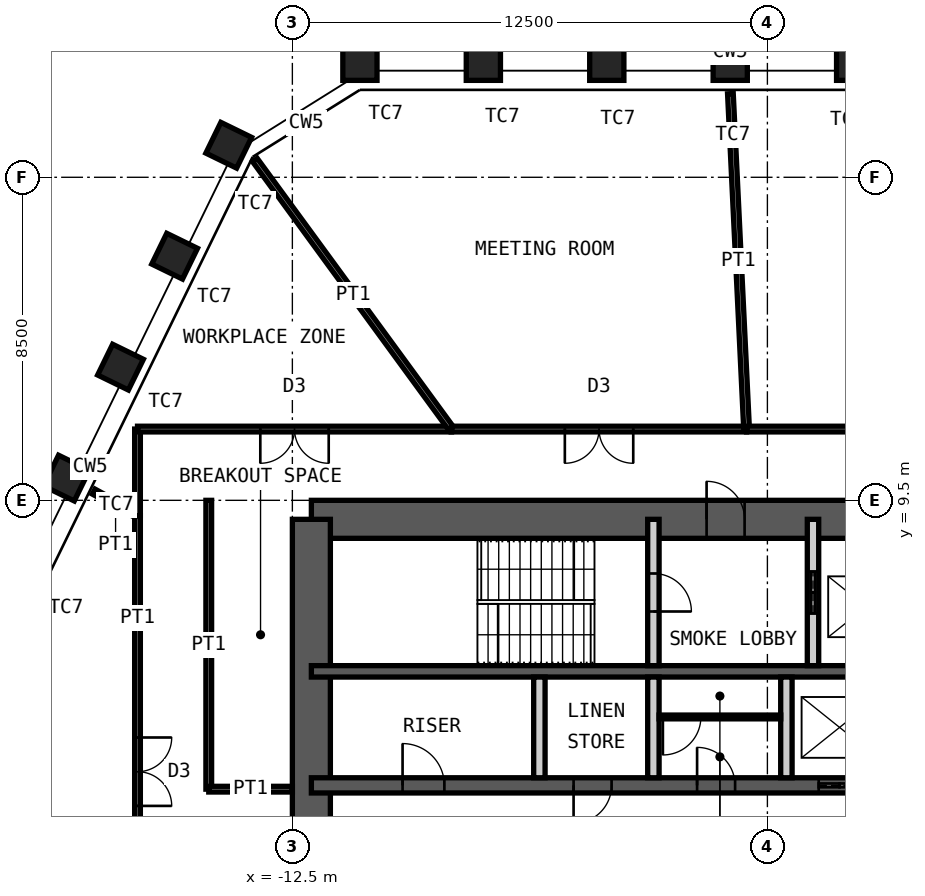
"""IFC4 building model, lengths in metres.
Left out: names, types, materials, properties, quantities, classifications, styles, units other than length and angle.
Written with IfcOpenShell. Run it as: python <this file> out.ifc"""

import sys

from ifc_helpers import new_model, si_unit, direction, frame, frame_2d, origin, origin_2d, place, context, subcontext, project, spatial, rectangle, hollow_rectangle, extrude, element, fill, save


model = new_model("IFC4")
c1 = context("Model", 3, precision=1e-05, world=origin(), true_north=direction((0.0, 1.0)))
c2 = subcontext(c1, "Body", "Model", "MODEL_VIEW")
j1 = project(units=[si_unit("LENGTHUNIT", "METRE"), si_unit("PLANEANGLEUNIT", "RADIAN")], contexts=[c1])
p1 = place(None, origin())
s1 = spatial("IfcSite", under=j1, at=p1, CompositionType="ELEMENT")
p2 = place(p1, origin())
s2 = spatial("IfcBuilding", under=s1, at=p2, CompositionType="ELEMENT")
p3 = place(p2, frame((0.0, 0.0, 295.6)))
s3 = spatial("IfcBuildingStorey", under=s2, at=p3, CompositionType="ELEMENT", Elevation=295.6)
for number, where, z_axis, x_axis in (
    (1, (-10.722, 21.0, 0.0), (0.0, 0.0, 1.0), (-1.0, 0.0, 0.0)),
    (2, (-7.474, 21.0, 0.0), (0.0, 0.0, 1.0), (-1.0, 0.0, 0.0)),
    (3, (-4.226, 21.0, 0.0), (0.0, 0.0, 1.0), (-1.0, 0.0, 0.0)),
    (4, (-0.978, 21.0, 0.0), (0.0, 0.0, 1.0), (-1.0, 0.0, 0.0)),
    (5, (2.27, 21.0, 0.0), (0.0, 0.0, 1.0), (-1.0, 0.0, 0.0)),
    (6, (-18.446, 10.085, 0.0), (0.0, 0.0, 1.0), (-0.438, -0.899, 0.0)),
    (7, (-17.022, 13.004, 0.0), (0.0, 0.0, 1.0), (-0.438, -0.899, 0.0)),
    (8, (-15.598, 15.924, 0.0), (0.0, 0.0, 1.0), (-0.438, -0.899, 0.0)),
    (9, (-14.174, 18.843, 0.0), (0.0, 0.0, 1.0), (-0.438, -0.899, 0.0)),
):
    element("IfcColumn", number, at=place(p3, frame(where, z_axis=z_axis, x_axis=x_axis)), inside=s3, PredefinedType="COLUMN", context=c2, shape_type="SweptSolid", body=[
        extrude(hollow_rectangle(XDim=0.9, YDim=0.9, WallThickness=0.06, at=origin_2d()), origin(), (0.0, 0.0, 1.0), 4.2),
    ])
p4 = place(p3, frame((-12.0, 9.0, 0.0), z_axis=(0.0, 0.0, 1.0), x_axis=(1.0, 0.0, 0.0)))
e10 = element("IfcWall", 10, at=p4, inside=s3, PredefinedType="SHEAR", context=c2, shape_type="SweptSolid", body=[
    extrude(rectangle(XDim=24.0, YDim=1.0, at=frame_2d((12.0, 0.0))), origin(), (0.0, 0.0, 1.0), 4.2),
])
p5 = place(p4, frame((10.4, 0.0, 0.0)))
e11 = element("IfcOpeningElement", 11, at=p5, cuts=e10, PredefinedType="OPENING", context=c2, shape_type="SweptSolid", body=[
    extrude(rectangle(XDim=1.0, YDim=2.1, at=frame_2d((0.5, 1.05))), frame((0.0, 0.51, 0.0), z_axis=(0.0, -1.0, 0.0), x_axis=(1.0, 0.0, 0.0)), (0.0, 0.0, 1.0), 1.02),
])
p6 = place(p4, frame((17.6, 0.0, 0.0)))
e12 = element("IfcOpeningElement", 12, at=p6, cuts=e10, PredefinedType="OPENING", context=c2, shape_type="SweptSolid", body=[
    extrude(rectangle(XDim=0.9, YDim=2.1, at=frame_2d((0.45, 1.05))), frame((0.0, 0.51, 0.0), z_axis=(0.0, -1.0, 0.0), x_axis=(1.0, 0.0, 0.0)), (0.0, 0.0, 1.0), 1.02),
])
p7 = place(p4, frame((21.9, 0.0, 0.0)))
e13 = element("IfcOpeningElement", 13, at=p7, cuts=e10, PredefinedType="OPENING", context=c2, shape_type="SweptSolid", body=[
    extrude(rectangle(XDim=0.9, YDim=2.1, at=frame_2d((0.45, 1.05))), frame((0.0, 0.51, 0.0), z_axis=(0.0, -1.0, 0.0), x_axis=(1.0, 0.0, 0.0)), (0.0, 0.0, 1.0), 1.02),
])
p8 = place(p3, frame((-12.0, -9.0, 0.0), z_axis=(0.0, 0.0, 1.0), x_axis=(0.0, 1.0, 0.0)))
e14 = element("IfcWall", 14, at=p8, inside=s3, PredefinedType="SHEAR", context=c2, shape_type="SweptSolid", body=[
    extrude(rectangle(XDim=18.0, YDim=1.0, at=frame_2d((9.0, 0.0))), origin(), (0.0, 0.0, 1.0), 4.2),
])
p9 = place(p8, frame((8.1, 0.0, 0.0)))
e15 = element("IfcOpeningElement", 15, at=p9, cuts=e14, PredefinedType="OPENING", context=c2, shape_type="SweptSolid", body=[
    extrude(rectangle(XDim=1.8, YDim=2.1, at=frame_2d((0.9, 1.05))), frame((0.0, 0.51, 0.0), z_axis=(0.0, -1.0, 0.0), x_axis=(1.0, 0.0, 0.0)), (0.0, 0.0, 1.0), 1.02),
])
p10 = place(p3, frame((-12.0, 5.0, 0.0), z_axis=(0.0, 0.0, 1.0), x_axis=(1.0, 0.0, 0.0)))
e16 = element("IfcWall", 16, at=p10, inside=s3, PredefinedType="SHEAR", context=c2, shape_type="SweptSolid", body=[
    extrude(rectangle(XDim=24.0, YDim=0.3, at=frame_2d((12.0, 0.0))), origin(), (0.0, 0.0, 1.0), 4.2),
])
p11 = place(p3, frame((-12.0, 2.0, 0.0), z_axis=(0.0, 0.0, 1.0), x_axis=(1.0, 0.0, 0.0)))
e17 = element("IfcWall", 17, at=p11, inside=s3, PredefinedType="SHEAR", context=c2, shape_type="SweptSolid", body=[
    extrude(rectangle(XDim=24.0, YDim=0.4, at=frame_2d((12.0, 0.0))), origin(), (0.0, 0.0, 1.0), 4.2),
])
p12 = place(p11, frame((2.4, 0.0, 0.0)))
e18 = element("IfcOpeningElement", 18, at=p12, cuts=e17, PredefinedType="OPENING", context=c2, shape_type="SweptSolid", body=[
    extrude(rectangle(XDim=1.1, YDim=2.1, at=frame_2d((0.55, 1.05))), frame((0.0, 0.21, 0.0), z_axis=(0.0, -1.0, 0.0), x_axis=(1.0, 0.0, 0.0)), (0.0, 0.0, 1.0), 0.42),
])
p13 = place(p11, frame((22.0, 0.0, 0.0)))
e19 = element("IfcOpeningElement", 19, at=p13, cuts=e17, PredefinedType="OPENING", context=c2, shape_type="SweptSolid", body=[
    extrude(rectangle(XDim=1.1, YDim=2.1, at=frame_2d((0.55, 1.05))), frame((0.0, 0.21, 0.0), z_axis=(0.0, -1.0, 0.0), x_axis=(1.0, 0.0, 0.0)), (0.0, 0.0, 1.0), 0.42),
])
p14 = place(p11, frame((10.15, 0.0, 0.0)))
e20 = element("IfcOpeningElement", 20, at=p14, cuts=e17, PredefinedType="OPENING", context=c2, shape_type="SweptSolid", body=[
    extrude(rectangle(XDim=1.0, YDim=2.1, at=frame_2d((0.5, 1.05))), frame((0.0, 0.21, 0.0), z_axis=(0.0, -1.0, 0.0), x_axis=(1.0, 0.0, 0.0)), (0.0, 0.0, 1.0), 0.42),
])
p15 = place(p11, frame((6.9, 0.0, 0.0)))
e21 = element("IfcOpeningElement", 21, at=p15, cuts=e17, PredefinedType="OPENING", context=c2, shape_type="SweptSolid", body=[
    extrude(rectangle(XDim=1.0, YDim=2.1, at=frame_2d((0.5, 1.05))), frame((0.0, 0.21, 0.0), z_axis=(0.0, -1.0, 0.0), x_axis=(1.0, 0.0, 0.0)), (0.0, 0.0, 1.0), 0.42),
])
p16 = place(p11, frame((13.35, 0.0, 0.0)))
e22 = element("IfcOpeningElement", 22, at=p16, cuts=e17, PredefinedType="OPENING", context=c2, shape_type="SweptSolid", body=[
    extrude(rectangle(XDim=1.1, YDim=2.4, at=frame_2d((0.55, 1.2))), frame((0.0, 0.21, 0.0), z_axis=(0.0, -1.0, 0.0), x_axis=(1.0, 0.0, 0.0)), (0.0, 0.0, 1.0), 0.42),
])
p17 = place(p11, frame((16.15, 0.0, 0.0)))
e23 = element("IfcOpeningElement", 23, at=p17, cuts=e17, PredefinedType="OPENING", context=c2, shape_type="SweptSolid", body=[
    extrude(rectangle(XDim=1.1, YDim=2.4, at=frame_2d((0.55, 1.2))), frame((0.0, 0.21, 0.0), z_axis=(0.0, -1.0, 0.0), x_axis=(1.0, 0.0, 0.0)), (0.0, 0.0, 1.0), 0.42),
])
p18 = place(p11, frame((19.0, 0.0, 0.0)))
e24 = element("IfcOpeningElement", 24, at=p18, cuts=e17, PredefinedType="OPENING", context=c2, shape_type="SweptSolid", body=[
    extrude(rectangle(XDim=1.0, YDim=2.1, at=frame_2d((0.5, 1.05))), frame((0.0, 0.21, 0.0), z_axis=(0.0, -1.0, 0.0), x_axis=(1.0, 0.0, 0.0)), (0.0, 0.0, 1.0), 0.42),
])
p19 = place(p3, frame((-3.0, 5.15, 0.0), z_axis=(0.0, 0.0, 1.0), x_axis=(0.0, 1.0, 0.0)))
e25 = element("IfcWall", 25, at=p19, inside=s3, PredefinedType="PARTITIONING", context=c2, shape_type="SweptSolid", body=[
    extrude(rectangle(XDim=3.85, YDim=0.3, at=frame_2d((1.925, 0.0))), origin(), (0.0, 0.0, 1.0), 3.98),
])
p20 = place(p19, frame((1.425, 0.0, 0.0)))
e26 = element("IfcOpeningElement", 26, at=p20, cuts=e25, PredefinedType="OPENING", context=c2, shape_type="SweptSolid", body=[
    extrude(rectangle(XDim=1.0, YDim=2.1, at=frame_2d((0.5, 1.05))), frame((0.0, 0.16, 0.0), z_axis=(0.0, -1.0, 0.0), x_axis=(1.0, 0.0, 0.0)), (0.0, 0.0, 1.0), 0.32),
])
p21 = place(p3, frame((1.2, 5.15, 0.0), z_axis=(0.0, 0.0, 1.0), x_axis=(0.0, 1.0, 0.0)))
e27 = element("IfcWall", 27, at=p21, inside=s3, PredefinedType="PARTITIONING", context=c2, shape_type="SweptSolid", body=[
    extrude(rectangle(XDim=3.85, YDim=0.3, at=frame_2d((1.925, 0.0))), origin(), (0.0, 0.0, 1.0), 3.98),
])
p22 = place(p21, frame((1.375, 0.0, 0.0)))
e28 = element("IfcOpeningElement", 28, at=p22, cuts=e27, PredefinedType="OPENING", context=c2, shape_type="SweptSolid", body=[
    extrude(rectangle(XDim=1.1, YDim=2.4, at=frame_2d((0.55, 1.2))), frame((0.0, 0.16, 0.0), z_axis=(0.0, -1.0, 0.0), x_axis=(1.0, 0.0, 0.0)), (0.0, 0.0, 1.0), 0.32),
])
for number, where, z_axis, x_axis in (
    (29, (-6.0, 2.2, 0.0), (0.0, 0.0, 1.0), (0.0, 1.0, 0.0)),
    (30, (-3.0, 2.2, 0.0), (0.0, 0.0, 1.0), (0.0, 1.0, 0.0)),
    (31, (0.5, 2.2, 0.0), (0.0, 0.0, 1.0), (0.0, 1.0, 0.0)),
):
    element("IfcWall", number, at=place(p3, frame(where, z_axis=z_axis, x_axis=x_axis)), inside=s3, PredefinedType="PARTITIONING", context=c2, shape_type="SweptSolid", body=[
        extrude(rectangle(XDim=2.65, YDim=0.3, at=frame_2d((1.325, 0.0))), origin(), (0.0, 0.0, 1.0), 3.98),
    ])
p23 = place(p3, frame((-2.85, 3.8, 0.0), z_axis=(0.0, 0.0, 1.0), x_axis=(1.0, 0.0, 0.0)))
e32 = element("IfcWall", 32, at=p23, inside=s3, PredefinedType="PARTITIONING", context=c2, shape_type="SweptSolid", body=[
    extrude(rectangle(XDim=3.2, YDim=0.1, at=frame_2d((1.6, 0.0))), origin(), (0.0, 0.0, 1.0), 3.98),
])
p24 = place(p23, frame((0.1, 0.0, 0.0)))
e33 = element("IfcOpeningElement", 33, at=p24, cuts=e32, PredefinedType="OPENING", context=c2, shape_type="SweptSolid", body=[
    extrude(rectangle(XDim=1.0, YDim=2.4, at=frame_2d((0.5, 1.2))), frame((0.0, 0.06, 0.0), z_axis=(0.0, -1.0, 0.0), x_axis=(1.0, 0.0, 0.0)), (0.0, 0.0, 1.0), 0.12),
])
p25 = place(p3, frame((-17.729, 9.73, 0.0), z_axis=(0.0, 0.0, 1.0), x_axis=(0.87667364743, -0.481085559855, 0.0)))
e34 = element("IfcWall", 34, at=p25, inside=s3, PredefinedType="PARTITIONING", context=c2, shape_type="SweptSolid", body=[
    extrude(rectangle(XDim=1.316, YDim=0.15, at=frame_2d((0.658, 0.0))), origin(), (0.0, 0.0, 1.0), 2.93),
])
p26 = place(p3, frame((-16.575, 9.097, 0.0), z_axis=(0.0, 0.0, 1.0), x_axis=(0.0, 1.0, 0.0)))
e35 = element("IfcWall", 35, at=p26, inside=s3, PredefinedType="PARTITIONING", context=c2, shape_type="SweptSolid", body=[
    extrude(rectangle(XDim=2.278, YDim=0.15, at=frame_2d((1.139, 0.0))), origin(), (0.0, 0.0, 1.0), 4.03),
])
p27 = place(p3, frame((-16.575, 11.375, 0.0), z_axis=(0.0, 0.0, 1.0), x_axis=(1.0, 0.0, 0.0)))
e36 = element("IfcWall", 36, at=p27, inside=s3, PredefinedType="PARTITIONING", context=c2, shape_type="SweptSolid", body=[
    extrude(rectangle(XDim=8.263, YDim=0.15, at=frame_2d((4.131, 0.0))), origin(), (0.0, 0.0, 1.0), 4.03),
])
p28 = place(p27, frame((3.231, 0.0, 0.0)))
e37 = element("IfcOpeningElement", 37, at=p28, cuts=e36, PredefinedType="OPENING", context=c2, shape_type="SweptSolid", body=[
    extrude(rectangle(XDim=1.8, YDim=2.4, at=frame_2d((0.9, 1.2))), frame((0.0, 0.085, 0.0), z_axis=(0.0, -1.0, 0.0), x_axis=(1.0, 0.0, 0.0)), (0.0, 0.0, 1.0), 0.17),
])
p29 = place(p3, frame((-13.486, 18.455, 0.0), z_axis=(0.0, 0.0, 1.0), x_axis=(0.589997742419, -0.807404894672, 0.0)))
e38 = element("IfcWall", 38, at=p29, inside=s3, PredefinedType="PARTITIONING", context=c2, shape_type="SweptSolid", body=[
    extrude(rectangle(XDim=8.769, YDim=0.15, at=frame_2d((4.385, 0.0))), origin(), (0.0, 0.0, 1.0), 3.03),
])
p30 = place(p3, frame((-8.312, 11.375, 0.0), z_axis=(0.0, 0.0, 1.0), x_axis=(1.0, 0.0, 0.0)))
e39 = element("IfcWall", 39, at=p30, inside=s3, PredefinedType="PARTITIONING", context=c2, shape_type="SweptSolid", body=[
    extrude(rectangle(XDim=7.764, YDim=0.15, at=frame_2d((3.882, 0.0))), origin(), (0.0, 0.0, 1.0), 4.03),
])
p31 = place(p30, frame((2.982, 0.0, 0.0)))
e40 = element("IfcOpeningElement", 40, at=p31, cuts=e39, PredefinedType="OPENING", context=c2, shape_type="SweptSolid", body=[
    extrude(rectangle(XDim=1.8, YDim=2.4, at=frame_2d((0.9, 1.2))), frame((0.0, 0.085, 0.0), z_axis=(0.0, -1.0, 0.0), x_axis=(1.0, 0.0, 0.0)), (0.0, 0.0, 1.0), 0.17),
])
p32 = place(p3, frame((-0.973, 20.2, 0.0), z_axis=(0.0, 0.0, 1.0), x_axis=(0.048134910622, -0.998840843368, 0.0)))
e41 = element("IfcWall", 41, at=p32, inside=s3, PredefinedType="PARTITIONING", context=c2, shape_type="SweptSolid", body=[
    extrude(rectangle(XDim=8.835, YDim=0.15, at=frame_2d((4.418, 0.0))), origin(), (0.0, 0.0, 1.0), 2.93),
])
p33 = place(p3, frame((-0.548, 11.375, 0.0), z_axis=(0.0, 0.0, 1.0), x_axis=(1.0, 0.0, 0.0)))
e42 = element("IfcWall", 42, at=p33, inside=s3, PredefinedType="PARTITIONING", context=c2, shape_type="SweptSolid", body=[
    extrude(rectangle(XDim=13.923, YDim=0.15, at=frame_2d((6.961, 0.0))), origin(), (0.0, 0.0, 1.0), 4.03),
])
p34 = place(p33, frame((6.062, 0.0, 0.0)))
e43 = element("IfcOpeningElement", 43, at=p34, cuts=e42, PredefinedType="OPENING", context=c2, shape_type="SweptSolid", body=[
    extrude(rectangle(XDim=1.8, YDim=2.4, at=frame_2d((0.9, 1.2))), frame((0.0, 0.085, 0.0), z_axis=(0.0, -1.0, 0.0), x_axis=(1.0, 0.0, 0.0)), (0.0, 0.0, 1.0), 0.17),
])
p35 = place(p3, frame((-16.575, -4.377, 0.0), z_axis=(0.0, 0.0, 1.0), x_axis=(0.0, 1.0, 0.0)))
e44 = element("IfcWall", 44, at=p35, inside=s3, PredefinedType="PARTITIONING", context=c2, shape_type="SweptSolid", body=[
    extrude(rectangle(XDim=13.474, YDim=0.15, at=frame_2d((6.737, 0.0))), origin(), (0.0, 0.0, 1.0), 4.03),
])
p36 = place(p35, frame((5.837, 0.0, 0.0)))
e45 = element("IfcOpeningElement", 45, at=p36, cuts=e44, PredefinedType="OPENING", context=c2, shape_type="SweptSolid", body=[
    extrude(rectangle(XDim=1.8, YDim=2.4, at=frame_2d((0.9, 1.2))), frame((0.0, 0.085, 0.0), z_axis=(0.0, -1.0, 0.0), x_axis=(1.0, 0.0, 0.0)), (0.0, 0.0, 1.0), 0.17),
])
p37 = place(p3, frame((-14.7, 1.9, 0.0), z_axis=(0.0, 0.0, 1.0), x_axis=(0.0, 1.0, 0.0)))
e46 = element("IfcWall", 46, at=p37, inside=s3, PredefinedType="PARTITIONING", context=c2, shape_type="SweptSolid", body=[
    extrude(rectangle(XDim=7.6, YDim=0.15, at=frame_2d((3.8, 0.0))), origin(), (0.0, 0.0, 1.0), 4.03),
])
p38 = place(p3, frame((-12.5, 1.9, 0.0), z_axis=(0.0, 0.0, 1.0), x_axis=(-1.0, 0.0, 0.0)))
e47 = element("IfcWall", 47, at=p38, inside=s3, PredefinedType="PARTITIONING", context=c2, shape_type="SweptSolid", body=[
    extrude(rectangle(XDim=2.2, YDim=0.15, at=frame_2d((1.1, 0.0))), origin(), (0.0, 0.0, 1.0), 3.13),
])
p39 = place(p5, origin())
e48 = element("IfcDoor", 48, at=p39, inside=s3, OperationType="SINGLE_SWING_RIGHT", PredefinedType="DOOR", context=c2, shape_type="SweptSolid", body=[
    extrude(rectangle(XDim=1.0, YDim=2.1, at=frame_2d((0.5, 1.05))), frame((0.0, 0.025, 0.0), z_axis=(0.0, -1.0, 0.0), x_axis=(1.0, 0.0, 0.0)), (0.0, 0.0, 1.0), 0.05),
])
fill(e11, e48)
p40 = place(p20, origin())
e49 = element("IfcDoor", 49, at=p40, inside=s3, OperationType="SINGLE_SWING_LEFT", PredefinedType="DOOR", context=c2, shape_type="SweptSolid", body=[
    extrude(rectangle(XDim=1.0, YDim=2.1, at=frame_2d((0.5, 1.05))), frame((0.0, 0.025, 0.0), z_axis=(0.0, -1.0, 0.0), x_axis=(1.0, 0.0, 0.0)), (0.0, 0.0, 1.0), 0.05),
])
fill(e26, e49)
p41 = place(p12, origin())
e50 = element("IfcDoor", 50, at=p41, inside=s3, OperationType="SINGLE_SWING_RIGHT", PredefinedType="DOOR", context=c2, shape_type="SweptSolid", body=[
    extrude(rectangle(XDim=1.1, YDim=2.1, at=frame_2d((0.55, 1.05))), frame((0.0, 0.025, 0.0), z_axis=(0.0, -1.0, 0.0), x_axis=(1.0, 0.0, 0.0)), (0.0, 0.0, 1.0), 0.05),
])
fill(e18, e50)
p42 = place(p14, origin())
e51 = element("IfcDoor", 51, at=p42, inside=s3, OperationType="SINGLE_SWING_RIGHT", PredefinedType="DOOR", context=c2, shape_type="SweptSolid", body=[
    extrude(rectangle(XDim=1.0, YDim=2.1, at=frame_2d((0.5, 1.05))), frame((0.0, 0.025, 0.0), z_axis=(0.0, -1.0, 0.0), x_axis=(1.0, 0.0, 0.0)), (0.0, 0.0, 1.0), 0.05),
])
fill(e20, e51)
p43 = place(p22, origin())
e52 = element("IfcDoor", 52, at=p43, inside=s3, OperationType="DOUBLE_DOOR_SLIDING", PredefinedType="DOOR", context=c2, shape_type="SweptSolid", body=[
    extrude(rectangle(XDim=1.1, YDim=2.4, at=frame_2d((0.55, 1.2))), frame((0.0, 0.025, 0.0), z_axis=(0.0, -1.0, 0.0), x_axis=(1.0, 0.0, 0.0)), (0.0, 0.0, 1.0), 0.05),
])
fill(e28, e52)
p44 = place(p15, origin())
e53 = element("IfcDoor", 53, at=p44, inside=s3, OperationType="SINGLE_SWING_LEFT", PredefinedType="DOOR", context=c2, shape_type="SweptSolid", body=[
    extrude(rectangle(XDim=1.0, YDim=2.1, at=frame_2d((0.5, 1.05))), frame((0.0, 0.025, 0.0), z_axis=(0.0, -1.0, 0.0), x_axis=(1.0, 0.0, 0.0)), (0.0, 0.0, 1.0), 0.05),
])
fill(e21, e53)
p45 = place(p16, origin())
e54 = element("IfcDoor", 54, at=p45, inside=s3, OperationType="DOUBLE_DOOR_SLIDING", PredefinedType="DOOR", context=c2, shape_type="SweptSolid", body=[
    extrude(rectangle(XDim=1.1, YDim=2.4, at=frame_2d((0.55, 1.2))), frame((0.0, 0.025, 0.0), z_axis=(0.0, -1.0, 0.0), x_axis=(1.0, 0.0, 0.0)), (0.0, 0.0, 1.0), 0.05),
])
fill(e22, e54)
p46 = place(p24, origin())
e55 = element("IfcDoor", 55, at=p46, inside=s3, OperationType="SINGLE_SWING_LEFT", PredefinedType="DOOR", context=c2, shape_type="SweptSolid", body=[
    extrude(rectangle(XDim=1.0, YDim=2.4, at=frame_2d((0.5, 1.2))), frame((0.0, 0.025, 0.0), z_axis=(0.0, -1.0, 0.0), x_axis=(1.0, 0.0, 0.0)), (0.0, 0.0, 1.0), 0.05),
])
fill(e33, e55)
p47 = place(p28, origin())
e56 = element("IfcDoor", 56, at=p47, inside=s3, OperationType="DOUBLE_DOOR_DOUBLE_SWING", PredefinedType="DOOR", context=c2, shape_type="SweptSolid", body=[
    extrude(rectangle(XDim=1.8, YDim=2.4, at=frame_2d((0.9, 1.2))), frame((0.0, 0.025, 0.0), z_axis=(0.0, -1.0, 0.0), x_axis=(1.0, 0.0, 0.0)), (0.0, 0.0, 1.0), 0.05),
])
fill(e37, e56)
p48 = place(p31, origin())
e57 = element("IfcDoor", 57, at=p48, inside=s3, OperationType="DOUBLE_DOOR_DOUBLE_SWING", PredefinedType="DOOR", context=c2, shape_type="SweptSolid", body=[
    extrude(rectangle(XDim=1.8, YDim=2.4, at=frame_2d((0.9, 1.2))), frame((0.0, 0.025, 0.0), z_axis=(0.0, -1.0, 0.0), x_axis=(1.0, 0.0, 0.0)), (0.0, 0.0, 1.0), 0.05),
])
fill(e40, e57)
p49 = place(p36, origin())
e58 = element("IfcDoor", 58, at=p49, inside=s3, OperationType="DOUBLE_DOOR_DOUBLE_SWING", PredefinedType="DOOR", context=c2, shape_type="SweptSolid", body=[
    extrude(rectangle(XDim=1.8, YDim=2.4, at=frame_2d((0.9, 1.2))), frame((0.0, 0.025, 0.0), z_axis=(0.0, -1.0, 0.0), x_axis=(1.0, 0.0, 0.0)), (0.0, 0.0, 1.0), 0.05),
])
fill(e45, e58)
save(model, sys.argv[1])
